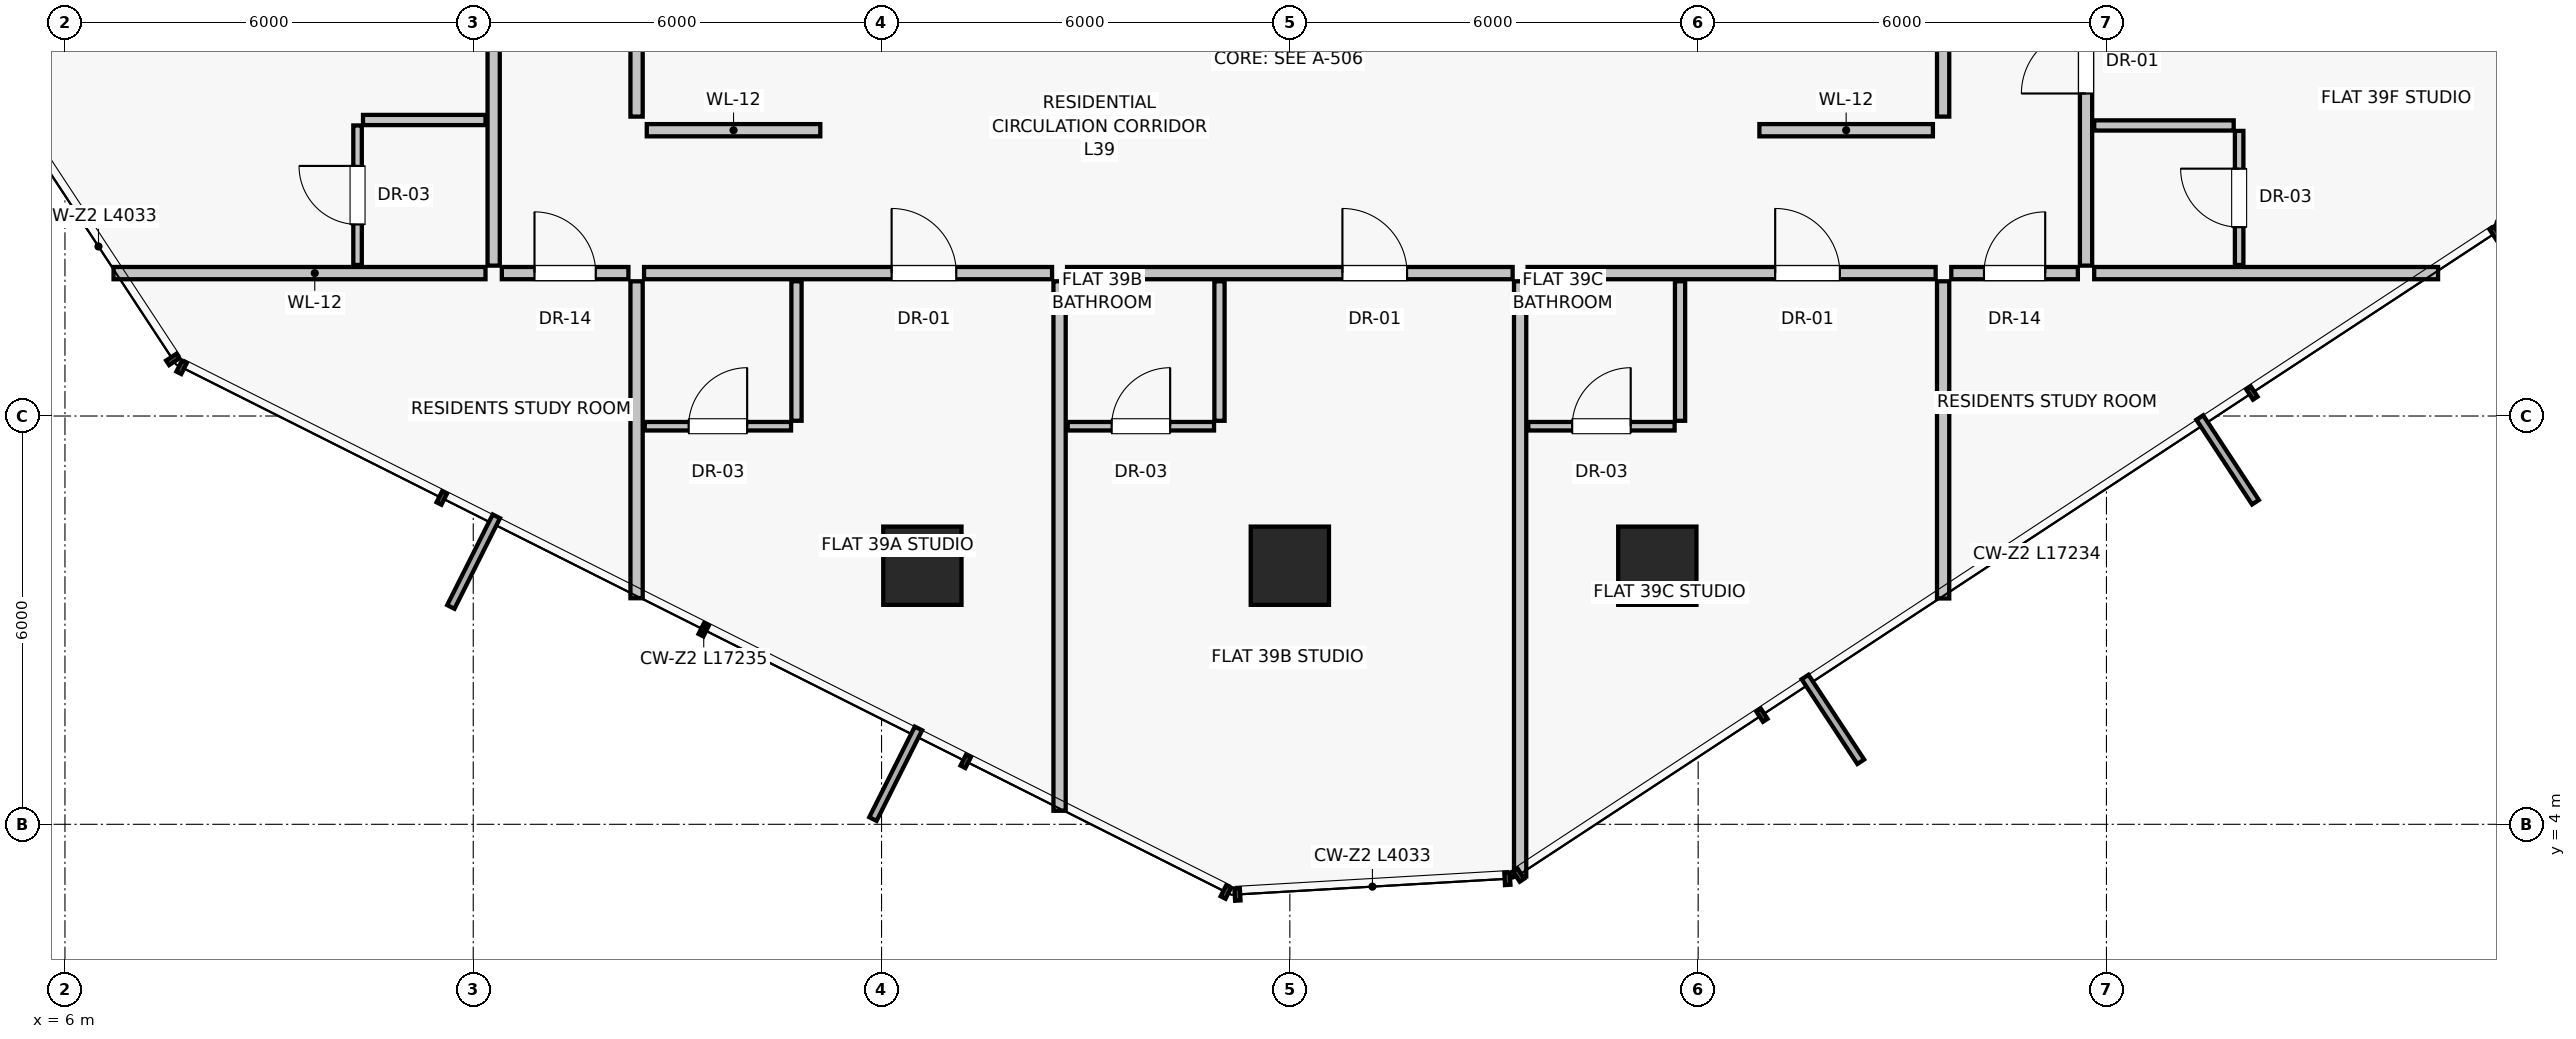
"""IFC4 building model, lengths in metres.
Left out: names, types, materials, properties, quantities, classifications, styles, units other than length and angle.
Written with IfcOpenShell. Run it as: python <this file> out.ifc"""

import sys

from ifc_helpers import new_model, si_unit, direction, frame, frame_2d, origin, origin_2d, place, context, subcontext, project, spatial, rectangle, extrude, source, transform, mapped, element, fill, save


model = new_model("IFC4")
c1 = context("Model", 3, precision=1e-05, world=origin(), true_north=direction((0.0, 1.0)))
c2 = subcontext(c1, "Body", "Model", "MODEL_VIEW")
j1 = project(units=[si_unit("LENGTHUNIT", "METRE"), si_unit("PLANEANGLEUNIT", "RADIAN")], contexts=[c1])
p1 = place(None, origin())
s1 = spatial("IfcSite", under=j1, at=p1, CompositionType="ELEMENT")
p2 = place(p1, origin())
s2 = spatial("IfcBuilding", under=s1, at=p2, CompositionType="ELEMENT")
p3 = place(p2, frame((0.0, 0.0, 139.25)))
s3 = spatial("IfcBuildingStorey", under=s2, at=p3, CompositionType="ELEMENT", Elevation=139.25)
for number, where, z_axis, x_axis in (
    (1, (18.6, 7.8, 0.0), (0.0, 0.0, 1.0), (1.0, 0.0, 0.0)),
    (2, (24.0, 7.8, 0.0), (0.0, 0.0, 1.0), (1.0, 0.0, 0.0)),
    (3, (29.4, 7.8, 0.0), (0.0, 0.0, 1.0), (1.0, 0.0, 0.0)),
):
    element("IfcColumn", number, at=place(p3, frame(where, z_axis=z_axis, x_axis=x_axis)), inside=s3, PredefinedType="COLUMN", context=c2, shape_type="SweptSolid", body=[
        extrude(rectangle(XDim=1.15, YDim=1.15, at=origin_2d()), origin(), (0.0, 0.0, 1.0), 3.25),
    ])
p4 = place(p3, frame((14.4, 14.4, 0.0), z_axis=(0.0, 0.0, 1.0), x_axis=(0.0, 1.0, 0.0)))
e4 = element("IfcWall", 4, at=p4, inside=s3, PredefinedType="PARTITIONING", context=c2, shape_type="SweptSolid", body=[
    extrude(rectangle(XDim=9.4, YDim=0.18, at=frame_2d((4.7, 0.0))), origin(), (0.0, 0.0, 1.0), 3.0),
])
p5 = place(p4, frame((3.8, 0.0, 0.0)))
e5 = element("IfcOpeningElement", 5, at=p5, cuts=e4, PredefinedType="OPENING", context=c2, shape_type="SweptSolid", body=[
    extrude(rectangle(XDim=0.9, YDim=2.01, at=frame_2d((0.45, 1.005))), frame((0.0, 0.1, 0.0), z_axis=(0.0, -1.0, 0.0), x_axis=(1.0, 0.0, 0.0)), (0.0, 0.0, 1.0), 0.2),
])
p6 = place(p3, frame((33.6, 14.4, 0.0), z_axis=(0.0, 0.0, 1.0), x_axis=(0.0, 1.0, 0.0)))
e6 = element("IfcWall", 6, at=p6, inside=s3, PredefinedType="PARTITIONING", context=c2, shape_type="SweptSolid", body=[
    extrude(rectangle(XDim=9.4, YDim=0.18, at=frame_2d((4.7, 0.0))), origin(), (0.0, 0.0, 1.0), 3.0),
])
p7 = place(p6, frame((3.8, 0.0, 0.0)))
e7 = element("IfcOpeningElement", 7, at=p7, cuts=e6, PredefinedType="OPENING", context=c2, shape_type="SweptSolid", body=[
    extrude(rectangle(XDim=0.9, YDim=2.01, at=frame_2d((0.45, 1.005))), frame((0.0, 0.1, 0.0), z_axis=(0.0, -1.0, 0.0), x_axis=(1.0, 0.0, 0.0)), (0.0, 0.0, 1.0), 0.2),
])
for number, where, z_axis, x_axis in (
    (8, (14.55, 14.2, 0.0), (0.0, 0.0, 1.0), (1.0, 0.0, 0.0)),
    (9, (30.9, 14.2, 0.0), (0.0, 0.0, 1.0), (1.0, 0.0, 0.0)),
):
    element("IfcWall", number, at=place(p3, frame(where, z_axis=z_axis, x_axis=x_axis)), inside=s3, PredefinedType="PARTITIONING", context=c2, shape_type="SweptSolid", body=[
        extrude(rectangle(XDim=2.55, YDim=0.18, at=frame_2d((1.275, 0.0))), origin(), (0.0, 0.0, 1.0), 3.0),
    ])
p8 = place(p3, frame((14.4, 11.98, 0.0), z_axis=(0.0, 0.0, 1.0), x_axis=(0.0, -1.0, 0.0)))
e10 = element("IfcWall", 10, at=p8, inside=s3, PredefinedType="PARTITIONING", context=c2, shape_type="SweptSolid", body=[
    extrude(rectangle(XDim=4.658, YDim=0.18, at=frame_2d((2.329, 0.0))), origin(), (0.0, 0.0, 1.0), 3.0),
])
p9 = place(p3, frame((33.6, 11.98, 0.0), z_axis=(0.0, 0.0, 1.0), x_axis=(0.0, -1.0, 0.0)))
e11 = element("IfcWall", 11, at=p9, inside=s3, PredefinedType="PARTITIONING", context=c2, shape_type="SweptSolid", body=[
    extrude(rectangle(XDim=4.661, YDim=0.18, at=frame_2d((2.331, 0.0))), origin(), (0.0, 0.0, 1.0), 3.0),
])
p10 = place(p3, frame((14.51, 12.1, 0.0), z_axis=(0.0, 0.0, 1.0), x_axis=(1.0, 0.0, 0.0)))
e12 = element("IfcWall", 12, at=p10, inside=s3, PredefinedType="PARTITIONING", context=c2, shape_type="SweptSolid", body=[
    extrude(rectangle(XDim=5.996, YDim=0.18, at=frame_2d((2.998, 0.0))), origin(), (0.0, 0.0, 1.0), 2.58),
])
p11 = place(p10, frame((3.638, 0.0, 0.0)))
e13 = element("IfcOpeningElement", 13, at=p11, cuts=e12, PredefinedType="OPENING", context=c2, shape_type="SweptSolid", body=[
    extrude(rectangle(XDim=0.95, YDim=2.02, at=frame_2d((0.475, 1.01))), frame((0.0, 0.1, 0.0), z_axis=(0.0, -1.0, 0.0), x_axis=(1.0, 0.0, 0.0)), (0.0, 0.0, 1.0), 0.2),
])
p12 = place(p3, frame((16.75, 11.98, 0.0), z_axis=(0.0, 0.0, 1.0), x_axis=(0.0, -1.0, 0.0)))
e14 = element("IfcWall", 14, at=p12, inside=s3, PredefinedType="PARTITIONING", context=c2, shape_type="SweptSolid", body=[
    extrude(rectangle(XDim=2.05, YDim=0.15, at=frame_2d((1.025, 0.0))), origin(), (0.0, 0.0, 1.0), 3.0),
])
p13 = place(p3, frame((14.52, 9.85, 0.0), z_axis=(0.0, 0.0, 1.0), x_axis=(1.0, 0.0, 0.0)))
e15 = element("IfcWall", 15, at=p13, inside=s3, PredefinedType="PARTITIONING", context=c2, shape_type="SweptSolid", body=[
    extrude(rectangle(XDim=2.15, YDim=0.125, at=frame_2d((1.075, 0.0))), origin(), (0.0, 0.0, 1.0), 3.0),
])
p14 = place(p13, frame((0.645, 0.0, 0.0)))
e16 = element("IfcOpeningElement", 16, at=p14, cuts=e15, PredefinedType="OPENING", context=c2, shape_type="SweptSolid", body=[
    extrude(rectangle(XDim=0.86, YDim=2.01, at=frame_2d((0.43, 1.005))), frame((0.0, 0.073, 0.0), z_axis=(0.0, -1.0, 0.0), x_axis=(1.0, 0.0, 0.0)), (0.0, 0.0, 1.0), 0.145),
])
p15 = place(p3, frame((20.616, 11.98, 0.0), z_axis=(0.0, 0.0, 1.0), x_axis=(0.0, -1.0, 0.0)))
e17 = element("IfcWall", 17, at=p15, inside=s3, PredefinedType="PARTITIONING", context=c2, shape_type="SweptSolid", body=[
    extrude(rectangle(XDim=7.781, YDim=0.18, at=frame_2d((3.891, 0.0))), origin(), (0.0, 0.0, 1.0), 3.0),
])
p16 = place(p3, frame((20.726, 12.1, 0.0), z_axis=(0.0, 0.0, 1.0), x_axis=(1.0, 0.0, 0.0)))
e18 = element("IfcWall", 18, at=p16, inside=s3, PredefinedType="PARTITIONING", context=c2, shape_type="SweptSolid", body=[
    extrude(rectangle(XDim=6.548, YDim=0.18, at=frame_2d((3.274, 0.0))), origin(), (0.0, 0.0, 1.0), 2.58),
])
p17 = place(p16, frame((4.046, 0.0, 0.0)))
e19 = element("IfcOpeningElement", 19, at=p17, cuts=e18, PredefinedType="OPENING", context=c2, shape_type="SweptSolid", body=[
    extrude(rectangle(XDim=0.95, YDim=2.02, at=frame_2d((0.475, 1.01))), frame((0.0, 0.1, 0.0), z_axis=(0.0, -1.0, 0.0), x_axis=(1.0, 0.0, 0.0)), (0.0, 0.0, 1.0), 0.2),
])
p18 = place(p3, frame((22.966, 11.98, 0.0), z_axis=(0.0, 0.0, 1.0), x_axis=(0.0, -1.0, 0.0)))
e20 = element("IfcWall", 20, at=p18, inside=s3, PredefinedType="PARTITIONING", context=c2, shape_type="SweptSolid", body=[
    extrude(rectangle(XDim=2.05, YDim=0.15, at=frame_2d((1.025, 0.0))), origin(), (0.0, 0.0, 1.0), 3.0),
])
p19 = place(p3, frame((20.736, 9.85, 0.0), z_axis=(0.0, 0.0, 1.0), x_axis=(1.0, 0.0, 0.0)))
e21 = element("IfcWall", 21, at=p19, inside=s3, PredefinedType="PARTITIONING", context=c2, shape_type="SweptSolid", body=[
    extrude(rectangle(XDim=2.15, YDim=0.125, at=frame_2d((1.075, 0.0))), origin(), (0.0, 0.0, 1.0), 3.0),
])
p20 = place(p19, frame((0.645, 0.0, 0.0)))
e22 = element("IfcOpeningElement", 22, at=p20, cuts=e21, PredefinedType="OPENING", context=c2, shape_type="SweptSolid", body=[
    extrude(rectangle(XDim=0.86, YDim=2.01, at=frame_2d((0.43, 1.005))), frame((0.0, 0.073, 0.0), z_axis=(0.0, -1.0, 0.0), x_axis=(1.0, 0.0, 0.0)), (0.0, 0.0, 1.0), 0.145),
])
p21 = place(p3, frame((27.384, 11.98, 0.0), z_axis=(0.0, 0.0, 1.0), x_axis=(0.0, -1.0, 0.0)))
e23 = element("IfcWall", 23, at=p21, inside=s3, PredefinedType="PARTITIONING", context=c2, shape_type="SweptSolid", body=[
    extrude(rectangle(XDim=8.747, YDim=0.18, at=frame_2d((4.374, 0.0))), origin(), (0.0, 0.0, 1.0), 3.0),
])
p22 = place(p3, frame((27.494, 12.1, 0.0), z_axis=(0.0, 0.0, 1.0), x_axis=(1.0, 0.0, 0.0)))
e24 = element("IfcWall", 24, at=p22, inside=s3, PredefinedType="PARTITIONING", context=c2, shape_type="SweptSolid", body=[
    extrude(rectangle(XDim=5.996, YDim=0.18, at=frame_2d((2.998, 0.0))), origin(), (0.0, 0.0, 1.0), 2.58),
])
p23 = place(p22, frame((3.638, 0.0, 0.0)))
e25 = element("IfcOpeningElement", 25, at=p23, cuts=e24, PredefinedType="OPENING", context=c2, shape_type="SweptSolid", body=[
    extrude(rectangle(XDim=0.95, YDim=2.02, at=frame_2d((0.475, 1.01))), frame((0.0, 0.1, 0.0), z_axis=(0.0, -1.0, 0.0), x_axis=(1.0, 0.0, 0.0)), (0.0, 0.0, 1.0), 0.2),
])
p24 = place(p3, frame((29.734, 11.98, 0.0), z_axis=(0.0, 0.0, 1.0), x_axis=(0.0, -1.0, 0.0)))
e26 = element("IfcWall", 26, at=p24, inside=s3, PredefinedType="PARTITIONING", context=c2, shape_type="SweptSolid", body=[
    extrude(rectangle(XDim=2.05, YDim=0.15, at=frame_2d((1.025, 0.0))), origin(), (0.0, 0.0, 1.0), 2.378),
])
p25 = place(p3, frame((27.504, 9.85, 0.0), z_axis=(0.0, 0.0, 1.0), x_axis=(1.0, 0.0, 0.0)))
e27 = element("IfcWall", 27, at=p25, inside=s3, PredefinedType="PARTITIONING", context=c2, shape_type="SweptSolid", body=[
    extrude(rectangle(XDim=2.15, YDim=0.125, at=frame_2d((1.075, 0.0))), origin(), (0.0, 0.0, 1.0), 3.0),
])
p26 = place(p25, frame((0.645, 0.0, 0.0)))
e28 = element("IfcOpeningElement", 28, at=p26, cuts=e27, PredefinedType="OPENING", context=c2, shape_type="SweptSolid", body=[
    extrude(rectangle(XDim=0.86, YDim=2.01, at=frame_2d((0.43, 1.005))), frame((0.0, 0.073, 0.0), z_axis=(0.0, -1.0, 0.0), x_axis=(1.0, 0.0, 0.0)), (0.0, 0.0, 1.0), 0.145),
])
p27 = place(p3, frame((12.18, 12.1, 0.0), z_axis=(0.0, 0.0, 1.0), x_axis=(-1.0, 0.0, 0.0)))
e29 = element("IfcWall", 29, at=p27, inside=s3, PredefinedType="PARTITIONING", context=c2, shape_type="SweptSolid", body=[
    extrude(rectangle(XDim=5.466, YDim=0.18, at=frame_2d((2.733, 0.0))), origin(), (0.0, 0.0, 1.0), 3.0),
])
p28 = place(p3, frame((12.3, 12.21, 0.0), z_axis=(0.0, 0.0, 1.0), x_axis=(0.0, 1.0, 0.0)))
e30 = element("IfcWall", 30, at=p28, inside=s3, PredefinedType="PARTITIONING", context=c2, shape_type="SweptSolid", body=[
    extrude(rectangle(XDim=13.308, YDim=0.18, at=frame_2d((6.654, 0.0))), origin(), (0.0, 0.0, 1.0), 2.58),
])
p29 = place(p28, frame((4.26, 0.0, 0.0)))
e31 = element("IfcOpeningElement", 31, at=p29, cuts=e30, PredefinedType="OPENING", context=c2, shape_type="SweptSolid", body=[
    extrude(rectangle(XDim=0.95, YDim=2.02, at=frame_2d((0.475, 1.01))), frame((0.0, 0.1, 0.0), z_axis=(0.0, -1.0, 0.0), x_axis=(1.0, 0.0, 0.0)), (0.0, 0.0, 1.0), 0.2),
])
p30 = place(p3, frame((12.18, 14.35, 0.0), z_axis=(0.0, 0.0, 1.0), x_axis=(-1.0, 0.0, 0.0)))
e32 = element("IfcWall", 32, at=p30, inside=s3, PredefinedType="PARTITIONING", context=c2, shape_type="SweptSolid", body=[
    extrude(rectangle(XDim=1.8, YDim=0.15, at=frame_2d((0.9, 0.0))), origin(), (0.0, 0.0, 1.0), 3.0),
])
p31 = place(p3, frame((10.3, 12.22, 0.0), z_axis=(0.0, 0.0, 1.0), x_axis=(0.0, 1.0, 0.0)))
e33 = element("IfcWall", 33, at=p31, inside=s3, PredefinedType="PARTITIONING", context=c2, shape_type="SweptSolid", body=[
    extrude(rectangle(XDim=2.05, YDim=0.125, at=frame_2d((1.025, 0.0))), origin(), (0.0, 0.0, 1.0), 3.0),
])
p32 = place(p31, frame((0.595, 0.0, 0.0)))
e34 = element("IfcOpeningElement", 34, at=p32, cuts=e33, PredefinedType="OPENING", context=c2, shape_type="SweptSolid", body=[
    extrude(rectangle(XDim=0.86, YDim=2.01, at=frame_2d((0.43, 1.005))), frame((0.0, 0.073, 0.0), z_axis=(0.0, -1.0, 0.0), x_axis=(1.0, 0.0, 0.0)), (0.0, 0.0, 1.0), 0.145),
])
p33 = place(p3, frame((35.82, 12.1, 0.0), z_axis=(0.0, 0.0, 1.0), x_axis=(1.0, 0.0, 0.0)))
e35 = element("IfcWall", 35, at=p33, inside=s3, PredefinedType="PARTITIONING", context=c2, shape_type="SweptSolid", body=[
    extrude(rectangle(XDim=5.053, YDim=0.18, at=frame_2d((2.527, 0.0))), origin(), (0.0, 0.0, 1.0), 3.0),
])
p34 = place(p3, frame((35.7, 12.21, 0.0), z_axis=(0.0, 0.0, 1.0), x_axis=(0.0, 1.0, 0.0)))
e36 = element("IfcWall", 36, at=p34, inside=s3, PredefinedType="PARTITIONING", context=c2, shape_type="SweptSolid", body=[
    extrude(rectangle(XDim=4.498, YDim=0.18, at=frame_2d((2.249, 0.0))), origin(), (0.0, 0.0, 1.0), 3.0),
])
p35 = place(p34, frame((2.53, 0.0, 0.0)))
e37 = element("IfcOpeningElement", 37, at=p35, cuts=e36, PredefinedType="OPENING", context=c2, shape_type="SweptSolid", body=[
    extrude(rectangle(XDim=0.95, YDim=2.02, at=frame_2d((0.475, 1.01))), frame((0.0, 0.1, 0.0), z_axis=(0.0, -1.0, 0.0), x_axis=(1.0, 0.0, 0.0)), (0.0, 0.0, 1.0), 0.2),
])
p36 = place(p3, frame((35.82, 14.27, 0.0), z_axis=(0.0, 0.0, 1.0), x_axis=(1.0, 0.0, 0.0)))
e38 = element("IfcWall", 38, at=p36, inside=s3, PredefinedType="PARTITIONING", context=c2, shape_type="SweptSolid", body=[
    extrude(rectangle(XDim=2.05, YDim=0.15, at=frame_2d((1.025, 0.0))), origin(), (0.0, 0.0, 1.0), 3.0),
])
p37 = place(p3, frame((37.95, 12.22, 0.0), z_axis=(0.0, 0.0, 1.0), x_axis=(0.0, 1.0, 0.0)))
e39 = element("IfcWall", 39, at=p37, inside=s3, PredefinedType="PARTITIONING", context=c2, shape_type="SweptSolid", body=[
    extrude(rectangle(XDim=1.97, YDim=0.125, at=frame_2d((0.985, 0.0))), origin(), (0.0, 0.0, 1.0), 3.0),
])
p38 = place(p37, frame((0.555, 0.0, 0.0)))
e40 = element("IfcOpeningElement", 40, at=p38, cuts=e39, PredefinedType="OPENING", context=c2, shape_type="SweptSolid", body=[
    extrude(rectangle(XDim=0.86, YDim=2.01, at=frame_2d((0.43, 1.005))), frame((0.0, 0.073, 0.0), z_axis=(0.0, -1.0, 0.0), x_axis=(1.0, 0.0, 0.0)), (0.0, 0.0, 1.0), 0.145),
])
p39 = place(p3, frame((12.42, 12.1, 0.0), z_axis=(0.0, 0.0, 1.0), x_axis=(1.0, 0.0, 0.0)))
e41 = element("IfcWall", 41, at=p39, inside=s3, PredefinedType="PARTITIONING", context=c2, shape_type="SweptSolid", body=[
    extrude(rectangle(XDim=1.86, YDim=0.18, at=frame_2d((0.93, 0.0))), origin(), (0.0, 0.0, 1.0), 3.0),
])
p40 = place(p39, frame((0.48, 0.0, 0.0)))
e42 = element("IfcOpeningElement", 42, at=p40, cuts=e41, PredefinedType="OPENING", context=c2, shape_type="SweptSolid", body=[
    extrude(rectangle(XDim=0.9, YDim=2.01, at=frame_2d((0.45, 1.005))), frame((0.0, 0.1, 0.0), z_axis=(0.0, -1.0, 0.0), x_axis=(1.0, 0.0, 0.0)), (0.0, 0.0, 1.0), 0.2),
])
p41 = place(p3, frame((33.72, 12.1, 0.0), z_axis=(0.0, 0.0, 1.0), x_axis=(1.0, 0.0, 0.0)))
e43 = element("IfcWall", 43, at=p41, inside=s3, PredefinedType="PARTITIONING", context=c2, shape_type="SweptSolid", body=[
    extrude(rectangle(XDim=1.86, YDim=0.18, at=frame_2d((0.93, 0.0))), origin(), (0.0, 0.0, 1.0), 3.0),
])
p42 = place(p41, frame((0.48, 0.0, 0.0)))
e44 = element("IfcOpeningElement", 44, at=p42, cuts=e43, PredefinedType="OPENING", context=c2, shape_type="SweptSolid", body=[
    extrude(rectangle(XDim=0.9, YDim=2.01, at=frame_2d((0.45, 1.005))), frame((0.0, 0.1, 0.0), z_axis=(0.0, -1.0, 0.0), x_axis=(1.0, 0.0, 0.0)), (0.0, 0.0, 1.0), 0.2),
])
m1 = source(origin(), c2, "Body", "SweptSolid", [
    extrude(rectangle(XDim=0.95, YDim=2.02, at=frame_2d((0.475, 1.01))), frame((0.0, 0.025, 0.0), z_axis=(0.0, -1.0, 0.0), x_axis=(1.0, 0.0, 0.0)), (0.0, 0.0, 1.0), 0.05),
])
p43 = place(p11, origin())
e45 = element("IfcDoor", 45, at=p43, inside=s3, OperationType="SINGLE_SWING_LEFT", PredefinedType="DOOR", context=c2, shape_type="MappedRepresentation", body=[
    mapped(m1, transform((0.0, 0.0, 0.0), scale=1.0)),
])
fill(e13, e45)
m2 = source(origin(), c2, "Body", "SweptSolid", [
    extrude(rectangle(XDim=0.86, YDim=2.01, at=frame_2d((0.43, 1.005))), frame((0.0, 0.025, 0.0), z_axis=(0.0, -1.0, 0.0), x_axis=(1.0, 0.0, 0.0)), (0.0, 0.0, 1.0), 0.05),
])
p44 = place(p14, origin())
e46 = element("IfcDoor", 46, at=p44, inside=s3, OperationType="SINGLE_SWING_RIGHT", PredefinedType="DOOR", context=c2, shape_type="MappedRepresentation", body=[
    mapped(m2, transform((0.0, 0.0, 0.0), scale=1.0)),
])
fill(e16, e46)
p45 = place(p17, origin())
e47 = element("IfcDoor", 47, at=p45, inside=s3, OperationType="SINGLE_SWING_LEFT", PredefinedType="DOOR", context=c2, shape_type="MappedRepresentation", body=[
    mapped(m1, transform((0.0, 0.0, 0.0), scale=1.0)),
])
fill(e19, e47)
p46 = place(p20, origin())
e48 = element("IfcDoor", 48, at=p46, inside=s3, OperationType="SINGLE_SWING_RIGHT", PredefinedType="DOOR", context=c2, shape_type="MappedRepresentation", body=[
    mapped(m2, transform((0.0, 0.0, 0.0), scale=1.0)),
])
fill(e22, e48)
p47 = place(p23, origin())
e49 = element("IfcDoor", 49, at=p47, inside=s3, OperationType="SINGLE_SWING_LEFT", PredefinedType="DOOR", context=c2, shape_type="MappedRepresentation", body=[
    mapped(m1, transform((0.0, 0.0, 0.0), scale=1.0)),
])
fill(e25, e49)
p48 = place(p26, origin())
e50 = element("IfcDoor", 50, at=p48, inside=s3, OperationType="SINGLE_SWING_RIGHT", PredefinedType="DOOR", context=c2, shape_type="MappedRepresentation", body=[
    mapped(m2, transform((0.0, 0.0, 0.0), scale=1.0)),
])
fill(e28, e50)
p49 = place(p32, origin())
e51 = element("IfcDoor", 51, at=p49, inside=s3, OperationType="SINGLE_SWING_RIGHT", PredefinedType="DOOR", context=c2, shape_type="MappedRepresentation", body=[
    mapped(m2, transform((0.0, 0.0, 0.0), scale=1.0)),
])
fill(e34, e51)
p50 = place(p35, origin())
e52 = element("IfcDoor", 52, at=p50, inside=s3, OperationType="SINGLE_SWING_LEFT", PredefinedType="DOOR", context=c2, shape_type="MappedRepresentation", body=[
    mapped(m1, transform((0.0, 0.0, 0.0), scale=1.0)),
])
fill(e37, e52)
p51 = place(p38, origin())
e53 = element("IfcDoor", 53, at=p51, inside=s3, OperationType="SINGLE_SWING_RIGHT", PredefinedType="DOOR", context=c2, shape_type="MappedRepresentation", body=[
    mapped(m2, transform((0.0, 0.0, 0.0), scale=1.0)),
])
fill(e40, e53)
m3 = source(origin(), c2, "Body", "SweptSolid", [
    extrude(rectangle(XDim=0.9, YDim=2.01, at=frame_2d((0.45, 1.005))), frame((0.0, 0.025, 0.0), z_axis=(0.0, -1.0, 0.0), x_axis=(1.0, 0.0, 0.0)), (0.0, 0.0, 1.0), 0.05),
])
p52 = place(p40, origin())
e54 = element("IfcDoor", 54, at=p52, inside=s3, OperationType="SINGLE_SWING_LEFT", PredefinedType="DOOR", context=c2, shape_type="MappedRepresentation", body=[
    mapped(m3, transform((0.0, 0.0, 0.0), scale=1.0)),
])
fill(e42, e54)
p53 = place(p42, origin())
e55 = element("IfcDoor", 55, at=p53, inside=s3, OperationType="SINGLE_SWING_RIGHT", PredefinedType="DOOR", context=c2, shape_type="MappedRepresentation", body=[
    mapped(m3, transform((0.0, 0.0, 0.0), scale=1.0)),
])
fill(e44, e55)
save(model, sys.argv[1])
